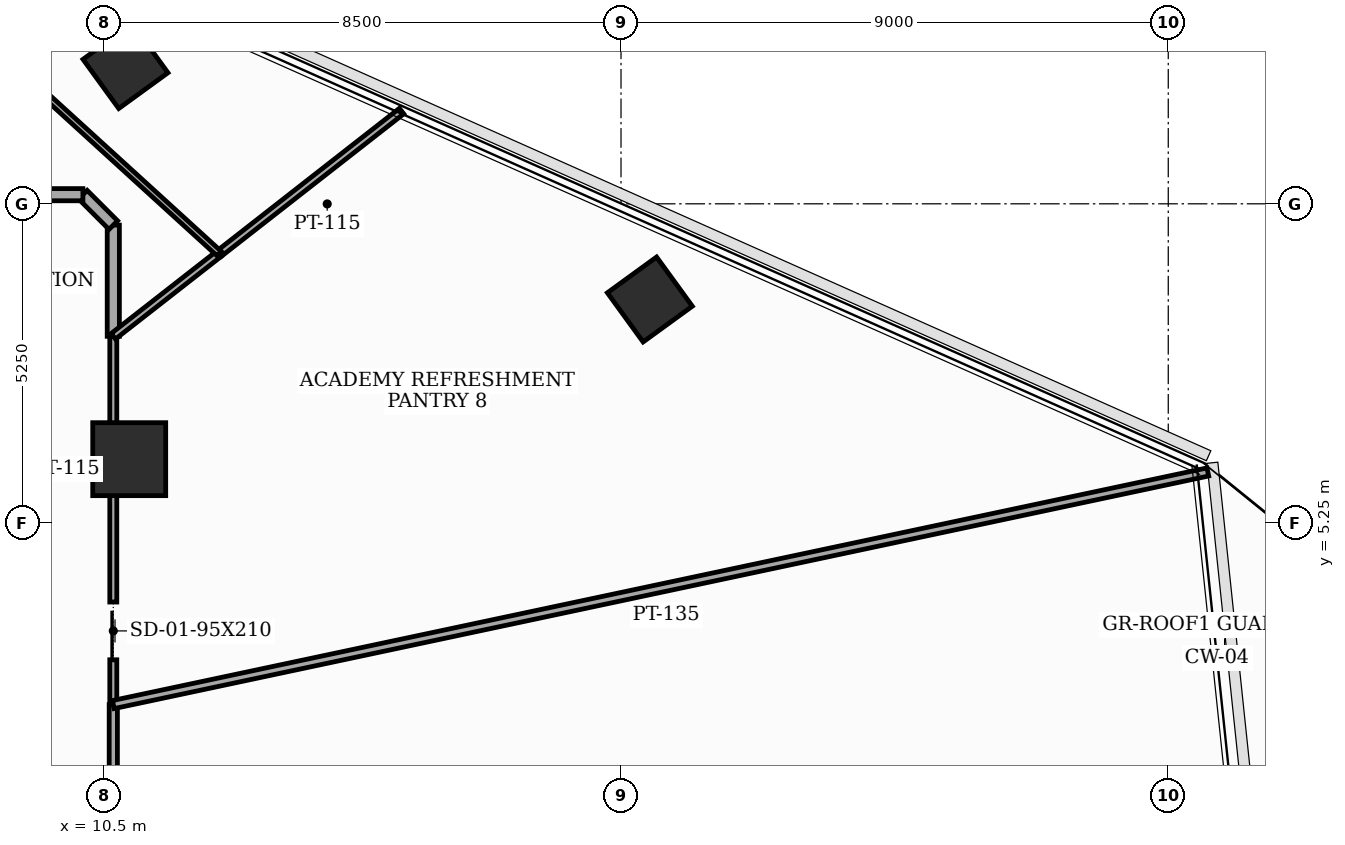
"""IFC4 building model, lengths in metres.
Left out: names, types, materials, properties, quantities, classifications, styles, units other than length and angle.
Written with IfcOpenShell. Run it as: python <this file> out.ifc"""

import sys

from ifc_helpers import new_model, si_unit, direction, frame, frame_2d, origin, origin_2d, place, context, subcontext, project, spatial, rectangle, extrude, element, fill, save


model = new_model("IFC4")
c1 = context("Model", 3, precision=1e-05, world=origin(), true_north=direction((0.0, 1.0)))
c2 = subcontext(c1, "Body", "Model", "MODEL_VIEW")
j1 = project(units=[si_unit("LENGTHUNIT", "METRE"), si_unit("PLANEANGLEUNIT", "RADIAN")], contexts=[c1])
p1 = place(None, origin())
s1 = spatial("IfcSite", under=j1, at=p1, CompositionType="ELEMENT")
p2 = place(p1, origin())
s2 = spatial("IfcBuilding", under=s1, at=p2, CompositionType="ELEMENT")
p3 = place(p2, frame((0.0, 0.0, 169.4)))
s3 = spatial("IfcBuildingStorey", under=s2, at=p3, CompositionType="ELEMENT", Elevation=169.4)
p4 = place(p3, frame((10.912, 6.3, 0.0), z_axis=(0.0, 0.0, 1.0), x_axis=(1.0, 0.0, 0.0)))
e1 = element("IfcColumn", 1, at=p4, inside=s3, PredefinedType="COLUMN", context=c2, shape_type="SweptSolid", body=[
    extrude(rectangle(XDim=1.2, YDim=1.2, at=origin_2d()), origin(), (0.0, 0.0, 1.0), 3.7),
])
for number, where, z_axis, x_axis in (
    (2, (19.474, 8.926, 0.0), (0.0, 0.0, 1.0), (0.809, 0.588, 0.0)),
    (3, (10.85, 12.766, 0.0), (0.0, 0.0, 1.0), (0.809, 0.588, 0.0)),
):
    element("IfcColumn", number, at=place(p3, frame(where, z_axis=z_axis, x_axis=x_axis)), inside=s3, PredefinedType="COLUMN", context=c2, shape_type="SweptSolid", body=[
        extrude(rectangle(XDim=1.0, YDim=1.0, at=origin_2d()), origin(), (0.0, 0.0, 1.0), 3.7),
    ])
p5 = place(p3, frame((10.65, -5.194, 0.0), z_axis=(0.0, 0.0, 1.0), x_axis=(0.0, 1.0, 0.0)))
e4 = element("IfcWall", 4, at=p5, inside=s3, PredefinedType="PARTITIONING", context=c2, shape_type="SweptSolid", body=[
    extrude(rectangle(XDim=7.458, YDim=0.135, at=frame_2d((3.729, 0.0))), origin(), (0.0, 0.0, 1.0), 2.885),
])
p6 = place(p5, frame((3.254, 0.0, 0.0)))
e5 = element("IfcOpeningElement", 5, at=p6, cuts=e4, PredefinedType="OPENING", context=c2, shape_type="SweptSolid", body=[
    extrude(rectangle(XDim=0.95, YDim=2.1, at=frame_2d((0.475, 1.05))), frame((0.0, 0.077, 0.0), z_axis=(0.0, -1.0, 0.0), x_axis=(1.0, 0.0, 0.0)), (0.0, 0.0, 1.0), 0.155),
])
p7 = place(p3, frame((10.65, 2.264, 0.0), z_axis=(0.0, 0.0, 1.0), x_axis=(0.0, 1.0, 0.0)))
e6 = element("IfcWall", 6, at=p7, inside=s3, PredefinedType="PARTITIONING", context=c2, shape_type="SweptSolid", body=[
    extrude(rectangle(XDim=6.057, YDim=0.115, at=frame_2d((3.029, 0.0))), origin(), (0.0, 0.0, 1.0), 2.885),
])
p8 = place(p7, frame((0.736, 0.0, 0.0)))
e7 = element("IfcOpeningElement", 7, at=p8, cuts=e6, PredefinedType="OPENING", context=c2, shape_type="SweptSolid", body=[
    extrude(rectangle(XDim=0.95, YDim=2.1, at=frame_2d((0.475, 1.05))), frame((0.0, 0.067, 0.0), z_axis=(0.0, -1.0, 0.0), x_axis=(1.0, 0.0, 0.0)), (0.0, 0.0, 1.0), 0.135),
])
p9 = place(p3, frame((10.65, 8.321, 0.0), z_axis=(0.0, 0.0, 1.0), x_axis=(0.0, 1.0, 0.0)))
e8 = element("IfcWall", 8, at=p9, inside=s3, PredefinedType="SOLIDWALL", context=c2, shape_type="SweptSolid", body=[
    extrude(rectangle(XDim=1.829, YDim=0.2, at=frame_2d((0.915, 0.0))), origin(), (0.0, 0.0, 1.0), 3.5),
])
p10 = place(p3, frame((10.65, 10.15, 0.0), z_axis=(0.0, 0.0, 1.0), x_axis=(-0.707106781187, 0.707106781187, 0.0)))
e9 = element("IfcWall", 9, at=p10, inside=s3, PredefinedType="SOLIDWALL", context=c2, shape_type="SweptSolid", body=[
    extrude(rectangle(XDim=0.707, YDim=0.2, at=frame_2d((0.354, 0.0))), origin(), (0.0, 0.0, 1.0), 3.5),
])
p11 = place(p3, frame((10.15, 10.65, 0.0), z_axis=(0.0, 0.0, 1.0), x_axis=(-1.0, 0.0, 0.0)))
e10 = element("IfcWall", 10, at=p11, inside=s3, PredefinedType="SOLIDWALL", context=c2, shape_type="SweptSolid", body=[
    extrude(rectangle(XDim=12.414, YDim=0.2, at=frame_2d((6.207, 0.0))), origin(), (0.0, 0.0, 1.0), 2.885),
])
p12 = place(p11, frame((7.222, 0.0, 0.0)))
e11 = element("IfcOpeningElement", 11, at=p12, cuts=e10, PredefinedType="OPENING", context=c2, shape_type="SweptSolid", body=[
    extrude(rectangle(XDim=0.95, YDim=2.1, at=frame_2d((0.475, 1.05))), frame((0.0, 0.11, 0.0), z_axis=(0.0, -1.0, 0.0), x_axis=(1.0, 0.0, 0.0)), (0.0, 0.0, 1.0), 0.22),
])
p13 = place(p3, frame((28.651, 6.09, 0.0), z_axis=(0.0, 0.0, 1.0), x_axis=(-0.978150893197, -0.207896200392, 0.0)))
e12 = element("IfcWall", 12, at=p13, inside=s3, PredefinedType="PARTITIONING", context=c2, shape_type="SweptSolid", body=[
    extrude(rectangle(XDim=18.403, YDim=0.135, at=frame_2d((9.202, 0.0))), origin(), (0.0, 0.0, 1.0), 2.885),
])
p14 = place(p3, frame((15.391, 12.025, 0.0), z_axis=(0.0, 0.0, 1.0), x_axis=(-0.787968951689, -0.615714975597, 0.0)))
e13 = element("IfcWall", 13, at=p14, inside=s3, PredefinedType="PARTITIONING", context=c2, shape_type="SweptSolid", body=[
    extrude(rectangle(XDim=3.807, YDim=0.115, at=frame_2d((1.903, 0.0))), origin(), (0.0, 0.0, 1.0), 2.985),
])
p15 = place(p3, frame((12.391, 9.681, 0.0), z_axis=(0.0, 0.0, 1.0), x_axis=(-0.788124883644, -0.615515367624, 0.0)))
e14 = element("IfcWall", 14, at=p15, inside=s3, PredefinedType="PARTITIONING", context=c2, shape_type="SweptSolid", body=[
    extrude(rectangle(XDim=2.209, YDim=0.115, at=frame_2d((1.104, 0.0))), origin(), (0.0, 0.0, 1.0), 3.5),
])
p16 = place(p3, frame((8.177, 13.52, 0.0), z_axis=(0.0, 0.0, 1.0), x_axis=(0.739232344885, -0.673450473514, 0.0)))
e15 = element("IfcWall", 15, at=p16, inside=s3, PredefinedType="MOVABLE", context=c2, shape_type="SweptSolid", body=[
    extrude(rectangle(XDim=5.701, YDim=0.1, at=frame_2d((2.85, 0.0))), origin(), (0.0, 0.0, 1.0), 2.885),
])
p17 = place(p8, origin())
e16 = element("IfcDoor", 16, at=p17, inside=s3, OperationType="SLIDING_TO_LEFT", PredefinedType="DOOR", context=c2, shape_type="SweptSolid", body=[
    extrude(rectangle(XDim=0.95, YDim=2.1, at=frame_2d((0.475, 1.05))), frame((0.0, 0.025, 0.0), z_axis=(0.0, -1.0, 0.0), x_axis=(1.0, 0.0, 0.0)), (0.0, 0.0, 1.0), 0.05),
])
fill(e7, e16)
save(model, sys.argv[1])
